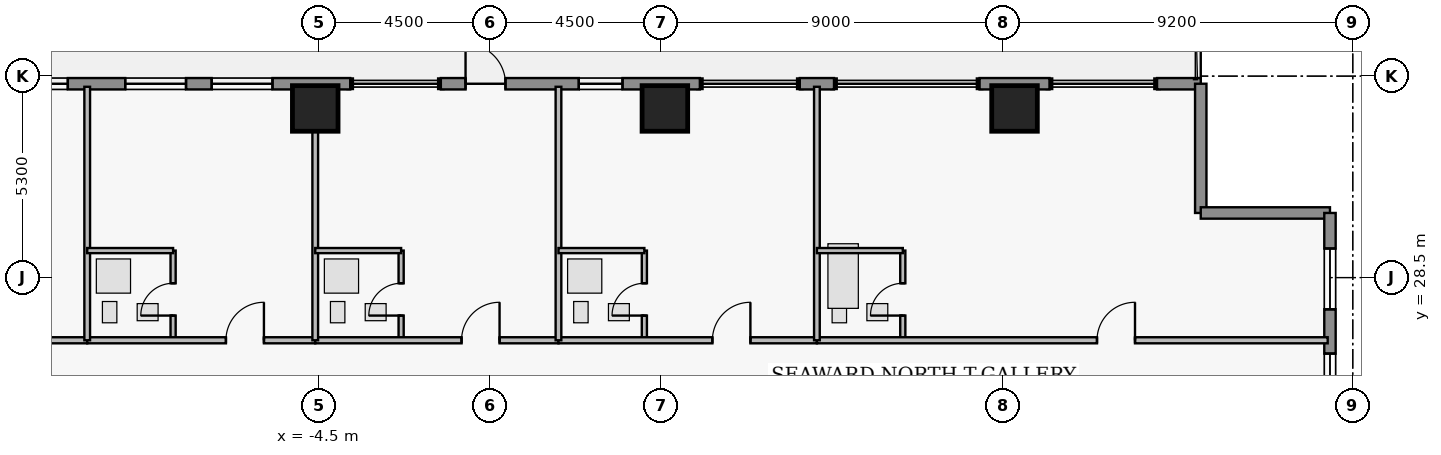
"""IFC4 building model, lengths in metres.
Left out: names, types, materials, properties, quantities, classifications, styles, units other than length and angle.
Written with IfcOpenShell. Run it as: python <this file> out.ifc"""

import sys

from ifc_helpers import new_model, si_unit, direction, frame, frame_2d, origin, origin_2d, place, context, subcontext, project, spatial, rectangle, extrude, element, fill, save


model = new_model("IFC4")
c1 = context("Model", 3, precision=1e-05, world=origin(), true_north=direction((0.0, 1.0)))
c2 = subcontext(c1, "Body", "Model", "MODEL_VIEW")
j1 = project(units=[si_unit("LENGTHUNIT", "METRE"), si_unit("PLANEANGLEUNIT", "RADIAN")], contexts=[c1])
p1 = place(None, origin())
s1 = spatial("IfcSite", under=j1, at=p1, CompositionType="ELEMENT")
p2 = place(p1, origin())
s2 = spatial("IfcBuilding", under=s1, at=p2, CompositionType="ELEMENT")
p3 = place(p2, frame((0.0, 0.0, 181.15)))
s3 = spatial("IfcBuildingStorey", under=s2, at=p3, CompositionType="ELEMENT", Elevation=181.15)
for number, where, z_axis, x_axis in (
    (1, (-4.6, 32.95, 0.0), (0.0, 0.0, 1.0), (1.0, 0.0, 0.0)),
    (2, (4.6, 32.95, 0.0), (0.0, 0.0, 1.0), (1.0, 0.0, 0.0)),
    (3, (13.8, 32.95, 0.0), (0.0, 0.0, 1.0), (1.0, 0.0, 0.0)),
):
    element("IfcColumn", number, at=place(p3, frame(where, z_axis=z_axis, x_axis=x_axis)), inside=s3, PredefinedType="COLUMN", context=c2, shape_type="SweptSolid", body=[
        extrude(rectangle(XDim=1.2, YDim=1.2, at=origin_2d()), origin(), (0.0, 0.0, 1.0), 3.75),
    ])
p4 = place(p3, frame((-14.72, 33.6, 0.0), z_axis=(0.0, 0.0, 1.0), x_axis=(1.0, 0.0, 0.0)))
e4 = element("IfcWall", 4, at=p4, inside=s3, PredefinedType="STANDARD", context=c2, shape_type="SweptSolid", body=[
    extrude(rectangle(XDim=11.04, YDim=0.3, at=frame_2d((5.52, 0.0))), origin(), (0.0, 0.0, 1.0), 3.53),
])
p5 = place(p4, frame((5.12, 0.0, 0.85)))
e5 = element("IfcOpeningElement", 5, at=p5, cuts=e4, PredefinedType="OPENING", context=c2, shape_type="SweptSolid", body=[
    extrude(rectangle(XDim=1.6, YDim=1.8, at=frame_2d((0.8, 0.9))), frame((0.0, 0.16, 0.0), z_axis=(0.0, -1.0, 0.0), x_axis=(1.0, 0.0, 0.0)), (0.0, 0.0, 1.0), 0.32),
])
p6 = place(p4, frame((2.01, 0.0, 0.85)))
e6 = element("IfcOpeningElement", 6, at=p6, cuts=e4, PredefinedType="OPENING", context=c2, shape_type="SweptSolid", body=[
    extrude(rectangle(XDim=1.6, YDim=1.8, at=frame_2d((0.8, 0.9))), frame((0.0, 0.16, 0.0), z_axis=(0.0, -1.0, 0.0), x_axis=(1.0, 0.0, 0.0)), (0.0, 0.0, 1.0), 0.32),
])
p7 = place(p4, frame((7.395, 0.0, 0.85)))
e7 = element("IfcOpeningElement", 7, at=p7, cuts=e4, PredefinedType="OPENING", context=c2, shape_type="SweptSolid", body=[
    extrude(rectangle(XDim=1.6, YDim=1.8, at=frame_2d((0.8, 0.9))), frame((0.0, 0.16, 0.0), z_axis=(0.0, -1.0, 0.0), x_axis=(1.0, 0.0, 0.0)), (0.0, 0.0, 1.0), 0.32),
])
p8 = place(p3, frame((-1.295, 33.6, 0.0), z_axis=(0.0, 0.0, 1.0), x_axis=(1.0, 0.0, 0.0)))
e8 = element("IfcWall", 8, at=p8, inside=s3, PredefinedType="STANDARD", context=c2, shape_type="SweptSolid", body=[
    extrude(rectangle(XDim=6.815, YDim=0.3, at=frame_2d((3.407, 0.0))), origin(), (0.0, 0.0, 1.0), 3.53),
])
p9 = place(p8, frame((0.65, 0.0, 0.0)))
e9 = element("IfcOpeningElement", 9, at=p9, cuts=e8, PredefinedType="OPENING", context=c2, shape_type="SweptSolid", body=[
    extrude(rectangle(XDim=1.05, YDim=2.2, at=frame_2d((0.525, 1.1))), frame((0.0, 0.16, 0.0), z_axis=(0.0, -1.0, 0.0), x_axis=(1.0, 0.0, 0.0)), (0.0, 0.0, 1.0), 0.32),
])
p10 = place(p8, frame((3.63, 0.0, 0.95)))
e10 = element("IfcOpeningElement", 10, at=p10, cuts=e8, PredefinedType="OPENING", context=c2, shape_type="SweptSolid", body=[
    extrude(rectangle(XDim=1.15, YDim=1.55, at=frame_2d((0.575, 0.775))), frame((0.0, 0.16, 0.0), z_axis=(0.0, -1.0, 0.0), x_axis=(1.0, 0.0, 0.0)), (0.0, 0.0, 1.0), 0.32),
])
p11 = place(p3, frame((8.15, 33.6, 0.0), z_axis=(0.0, 0.0, 1.0), x_axis=(1.0, 0.0, 0.0)))
e11 = element("IfcWall", 11, at=p11, inside=s3, PredefinedType="STANDARD", context=c2, shape_type="SweptSolid", body=[
    extrude(rectangle(XDim=0.9, YDim=0.3, at=frame_2d((0.45, 0.0))), origin(), (0.0, 0.0, 1.0), 3.53),
])
p12 = place(p3, frame((12.88, 33.6, 0.0), z_axis=(0.0, 0.0, 1.0), x_axis=(1.0, 0.0, 0.0)))
e12 = element("IfcWall", 12, at=p12, inside=s3, PredefinedType="STANDARD", context=c2, shape_type="SweptSolid", body=[
    extrude(rectangle(XDim=1.84, YDim=0.3, at=frame_2d((0.92, 0.0))), origin(), (0.0, 0.0, 1.0), 3.53),
])
p13 = place(p3, frame((17.55, 33.6, 0.0), z_axis=(0.0, 0.0, 1.0), x_axis=(1.0, 0.0, 0.0)))
e13 = element("IfcWall", 13, at=p13, inside=s3, PredefinedType="STANDARD", context=c2, shape_type="SweptSolid", body=[
    extrude(rectangle(XDim=1.15, YDim=0.3, at=frame_2d((0.575, 0.0))), origin(), (0.0, 0.0, 1.0), 3.53),
])
for number, where, z_axis, x_axis in (
    (14, (18.7, 33.6, 0.0), (0.0, 0.0, 1.0), (0.0, -1.0, 0.0)),
    (15, (18.7, 30.2, 0.0), (0.0, 0.0, 1.0), (1.0, 0.0, 0.0)),
):
    element("IfcWall", number, at=place(p3, frame(where, z_axis=z_axis, x_axis=x_axis)), inside=s3, PredefinedType="STANDARD", context=c2, shape_type="SweptSolid", body=[
        extrude(rectangle(XDim=3.4, YDim=0.3, at=frame_2d((1.7, 0.0))), origin(), (0.0, 0.0, 1.0), 3.53),
    ])
p14 = place(p3, frame((22.1, 30.2, 0.0), z_axis=(0.0, 0.0, 1.0), x_axis=(0.0, -1.0, 0.0)))
e16 = element("IfcWall", 16, at=p14, inside=s3, PredefinedType="STANDARD", context=c2, shape_type="SweptSolid", body=[
    extrude(rectangle(XDim=5.65, YDim=0.3, at=frame_2d((2.825, 0.0))), origin(), (0.0, 0.0, 1.0), 3.53),
])
p15 = place(p14, frame((0.935, 0.0, 0.85)))
e17 = element("IfcOpeningElement", 17, at=p15, cuts=e16, PredefinedType="OPENING", context=c2, shape_type="SweptSolid", body=[
    extrude(rectangle(XDim=1.6, YDim=1.8, at=frame_2d((0.8, 0.9))), frame((0.0, 0.16, 0.0), z_axis=(0.0, -1.0, 0.0), x_axis=(1.0, 0.0, 0.0)), (0.0, 0.0, 1.0), 0.32),
])
p16 = place(p14, frame((3.7, 0.0, 0.95)))
e18 = element("IfcOpeningElement", 18, at=p16, cuts=e16, PredefinedType="OPENING", context=c2, shape_type="SweptSolid", body=[
    extrude(rectangle(XDim=1.15, YDim=1.55, at=frame_2d((0.575, 0.775))), frame((0.0, 0.16, 0.0), z_axis=(0.0, -1.0, 0.0), x_axis=(1.0, 0.0, 0.0)), (0.0, 0.0, 1.0), 0.32),
])
p17 = place(p3, frame((-22.04, 26.85, 0.0), z_axis=(0.0, 0.0, 1.0), x_axis=(1.0, 0.0, 0.0)))
e19 = element("IfcWall", 19, at=p17, inside=s3, PredefinedType="PARTITIONING", context=c2, shape_type="SweptSolid", body=[
    extrude(rectangle(XDim=11.44, YDim=0.16, at=frame_2d((5.72, 0.0))), origin(), (0.0, 0.0, 1.0), 3.53),
])
p18 = place(p17, frame((6.37, 0.0, 0.0)))
e20 = element("IfcOpeningElement", 20, at=p18, cuts=e19, PredefinedType="OPENING", context=c2, shape_type="SweptSolid", body=[
    extrude(rectangle(XDim=1.0, YDim=2.15, at=frame_2d((0.5, 1.075))), frame((0.0, 0.09, 0.0), z_axis=(0.0, -1.0, 0.0), x_axis=(1.0, 0.0, 0.0)), (0.0, 0.0, 1.0), 0.18),
])
p19 = place(p3, frame((-8.34, 26.85, 0.0), z_axis=(0.0, 0.0, 1.0), x_axis=(0.0, 1.0, 0.0)))
e21 = element("IfcWall", 21, at=p19, inside=s3, PredefinedType="PLUMBINGWALL", context=c2, shape_type="SweptSolid", body=[
    extrude(rectangle(XDim=2.36, YDim=0.135, at=frame_2d((1.18, 0.0))), origin(), (0.0, 0.0, 1.0), 3.53),
])
p20 = place(p19, frame((0.65, 0.0, 0.0)))
e22 = element("IfcOpeningElement", 22, at=p20, cuts=e21, PredefinedType="OPENING", context=c2, shape_type="SweptSolid", body=[
    extrude(rectangle(XDim=0.85, YDim=2.1, at=frame_2d((0.425, 1.05))), frame((0.0, 0.077, 0.0), z_axis=(0.0, -1.0, 0.0), x_axis=(1.0, 0.0, 0.0)), (0.0, 0.0, 1.0), 0.155),
])
p21 = place(p3, frame((-10.6, 26.85, 0.0), z_axis=(0.0, 0.0, 1.0), x_axis=(1.0, 0.0, 0.0)))
e23 = element("IfcWall", 23, at=p21, inside=s3, PredefinedType="PARTITIONING", context=c2, shape_type="SweptSolid", body=[
    extrude(rectangle(XDim=6.0, YDim=0.16, at=frame_2d((3.0, 0.0))), origin(), (0.0, 0.0, 1.0), 3.53),
])
p22 = place(p21, frame((3.65, 0.0, 0.0)))
e24 = element("IfcOpeningElement", 24, at=p22, cuts=e23, PredefinedType="OPENING", context=c2, shape_type="SweptSolid", body=[
    extrude(rectangle(XDim=1.0, YDim=2.15, at=frame_2d((0.5, 1.075))), frame((0.0, 0.09, 0.0), z_axis=(0.0, -1.0, 0.0), x_axis=(1.0, 0.0, 0.0)), (0.0, 0.0, 1.0), 0.18),
])
p23 = place(p3, frame((-2.34, 26.85, 0.0), z_axis=(0.0, 0.0, 1.0), x_axis=(0.0, 1.0, 0.0)))
e25 = element("IfcWall", 25, at=p23, inside=s3, PredefinedType="PLUMBINGWALL", context=c2, shape_type="SweptSolid", body=[
    extrude(rectangle(XDim=2.36, YDim=0.135, at=frame_2d((1.18, 0.0))), origin(), (0.0, 0.0, 1.0), 3.53),
])
p24 = place(p23, frame((0.65, 0.0, 0.0)))
e26 = element("IfcOpeningElement", 26, at=p24, cuts=e25, PredefinedType="OPENING", context=c2, shape_type="SweptSolid", body=[
    extrude(rectangle(XDim=0.85, YDim=2.1, at=frame_2d((0.425, 1.05))), frame((0.0, 0.077, 0.0), z_axis=(0.0, -1.0, 0.0), x_axis=(1.0, 0.0, 0.0)), (0.0, 0.0, 1.0), 0.155),
])
p25 = place(p3, frame((-4.6, 26.85, 0.0), z_axis=(0.0, 0.0, 1.0), x_axis=(1.0, 0.0, 0.0)))
e27 = element("IfcWall", 27, at=p25, inside=s3, PredefinedType="PARTITIONING", context=c2, shape_type="SweptSolid", body=[
    extrude(rectangle(XDim=6.4, YDim=0.16, at=frame_2d((3.2, 0.0))), origin(), (0.0, 0.0, 1.0), 3.53),
])
p26 = place(p25, frame((3.85, 0.0, 0.0)))
e28 = element("IfcOpeningElement", 28, at=p26, cuts=e27, PredefinedType="OPENING", context=c2, shape_type="SweptSolid", body=[
    extrude(rectangle(XDim=1.0, YDim=2.15, at=frame_2d((0.5, 1.075))), frame((0.0, 0.09, 0.0), z_axis=(0.0, -1.0, 0.0), x_axis=(1.0, 0.0, 0.0)), (0.0, 0.0, 1.0), 0.18),
])
p27 = place(p3, frame((4.06, 26.85, 0.0), z_axis=(0.0, 0.0, 1.0), x_axis=(0.0, 1.0, 0.0)))
e29 = element("IfcWall", 29, at=p27, inside=s3, PredefinedType="PLUMBINGWALL", context=c2, shape_type="SweptSolid", body=[
    extrude(rectangle(XDim=2.36, YDim=0.135, at=frame_2d((1.18, 0.0))), origin(), (0.0, 0.0, 1.0), 3.53),
])
p28 = place(p27, frame((0.65, 0.0, 0.0)))
e30 = element("IfcOpeningElement", 30, at=p28, cuts=e29, PredefinedType="OPENING", context=c2, shape_type="SweptSolid", body=[
    extrude(rectangle(XDim=0.85, YDim=2.1, at=frame_2d((0.425, 1.05))), frame((0.0, 0.077, 0.0), z_axis=(0.0, -1.0, 0.0), x_axis=(1.0, 0.0, 0.0)), (0.0, 0.0, 1.0), 0.155),
])
p29 = place(p3, frame((1.8, 26.85, 0.0), z_axis=(0.0, 0.0, 1.0), x_axis=(1.0, 0.0, 0.0)))
e31 = element("IfcWall", 31, at=p29, inside=s3, PredefinedType="PARTITIONING", context=c2, shape_type="SweptSolid", body=[
    extrude(rectangle(XDim=6.8, YDim=0.16, at=frame_2d((3.4, 0.0))), origin(), (0.0, 0.0, 1.0), 3.53),
])
p30 = place(p29, frame((4.05, 0.0, 0.0)))
e32 = element("IfcOpeningElement", 32, at=p30, cuts=e31, PredefinedType="OPENING", context=c2, shape_type="SweptSolid", body=[
    extrude(rectangle(XDim=1.0, YDim=2.15, at=frame_2d((0.5, 1.075))), frame((0.0, 0.09, 0.0), z_axis=(0.0, -1.0, 0.0), x_axis=(1.0, 0.0, 0.0)), (0.0, 0.0, 1.0), 0.18),
])
p31 = place(p3, frame((10.86, 26.85, 0.0), z_axis=(0.0, 0.0, 1.0), x_axis=(0.0, 1.0, 0.0)))
e33 = element("IfcWall", 33, at=p31, inside=s3, PredefinedType="PLUMBINGWALL", context=c2, shape_type="SweptSolid", body=[
    extrude(rectangle(XDim=2.36, YDim=0.135, at=frame_2d((1.18, 0.0))), origin(), (0.0, 0.0, 1.0), 3.53),
])
p32 = place(p31, frame((0.65, 0.0, 0.0)))
e34 = element("IfcOpeningElement", 34, at=p32, cuts=e33, PredefinedType="OPENING", context=c2, shape_type="SweptSolid", body=[
    extrude(rectangle(XDim=0.85, YDim=2.1, at=frame_2d((0.425, 1.05))), frame((0.0, 0.077, 0.0), z_axis=(0.0, -1.0, 0.0), x_axis=(1.0, 0.0, 0.0)), (0.0, 0.0, 1.0), 0.155),
])
p33 = place(p3, frame((8.6, 26.85, 0.0), z_axis=(0.0, 0.0, 1.0), x_axis=(1.0, 0.0, 0.0)))
e35 = element("IfcWall", 35, at=p33, inside=s3, PredefinedType="PARTITIONING", context=c2, shape_type="SweptSolid", body=[
    extrude(rectangle(XDim=13.44, YDim=0.16, at=frame_2d((6.72, 0.0))), origin(), (0.0, 0.0, 1.0), 3.53),
])
p34 = place(p33, frame((7.37, 0.0, 0.0)))
e36 = element("IfcOpeningElement", 36, at=p34, cuts=e35, PredefinedType="OPENING", context=c2, shape_type="SweptSolid", body=[
    extrude(rectangle(XDim=1.0, YDim=2.15, at=frame_2d((0.5, 1.075))), frame((0.0, 0.09, 0.0), z_axis=(0.0, -1.0, 0.0), x_axis=(1.0, 0.0, 0.0)), (0.0, 0.0, 1.0), 0.18),
])
p35 = place(p3, frame((-10.6, 26.85, 0.0), z_axis=(0.0, 0.0, 1.0), x_axis=(0.0, 1.0, 0.0)))
e37 = element("IfcWall", 37, at=p35, inside=s3, PredefinedType="PARTITIONING", context=c2, shape_type="SweptSolid", body=[
    extrude(rectangle(XDim=6.67, YDim=0.15, at=frame_2d((3.335, 0.0))), origin(), (0.0, 0.0, 1.0), 3.53),
])
p36 = place(p3, frame((-10.6, 29.21, 0.0), z_axis=(0.0, 0.0, 1.0), x_axis=(1.0, 0.0, 0.0)))
e38 = element("IfcWall", 38, at=p36, inside=s3, PredefinedType="PLUMBINGWALL", context=c2, shape_type="SweptSolid", body=[
    extrude(rectangle(XDim=2.26, YDim=0.135, at=frame_2d((1.13, 0.0))), origin(), (0.0, 0.0, 1.0), 3.53),
])
p37 = place(p3, frame((-4.6, 26.85, 0.0), z_axis=(0.0, 0.0, 1.0), x_axis=(0.0, 1.0, 0.0)))
e39 = element("IfcWall", 39, at=p37, inside=s3, PredefinedType="PARTITIONING", context=c2, shape_type="SweptSolid", body=[
    extrude(rectangle(XDim=6.67, YDim=0.15, at=frame_2d((3.335, 0.0))), origin(), (0.0, 0.0, 1.0), 2.519),
])
p38 = place(p3, frame((-4.6, 29.21, 0.0), z_axis=(0.0, 0.0, 1.0), x_axis=(1.0, 0.0, 0.0)))
e40 = element("IfcWall", 40, at=p38, inside=s3, PredefinedType="PLUMBINGWALL", context=c2, shape_type="SweptSolid", body=[
    extrude(rectangle(XDim=2.26, YDim=0.135, at=frame_2d((1.13, 0.0))), origin(), (0.0, 0.0, 1.0), 3.53),
])
p39 = place(p3, frame((1.8, 26.85, 0.0), z_axis=(0.0, 0.0, 1.0), x_axis=(0.0, 1.0, 0.0)))
e41 = element("IfcWall", 41, at=p39, inside=s3, PredefinedType="PARTITIONING", context=c2, shape_type="SweptSolid", body=[
    extrude(rectangle(XDim=6.67, YDim=0.15, at=frame_2d((3.335, 0.0))), origin(), (0.0, 0.0, 1.0), 3.53),
])
p40 = place(p3, frame((1.8, 29.21, 0.0), z_axis=(0.0, 0.0, 1.0), x_axis=(1.0, 0.0, 0.0)))
e42 = element("IfcWall", 42, at=p40, inside=s3, PredefinedType="PLUMBINGWALL", context=c2, shape_type="SweptSolid", body=[
    extrude(rectangle(XDim=2.26, YDim=0.135, at=frame_2d((1.13, 0.0))), origin(), (0.0, 0.0, 1.0), 3.53),
])
p41 = place(p3, frame((8.6, 26.85, 0.0), z_axis=(0.0, 0.0, 1.0), x_axis=(0.0, 1.0, 0.0)))
e43 = element("IfcWall", 43, at=p41, inside=s3, PredefinedType="PARTITIONING", context=c2, shape_type="SweptSolid", body=[
    extrude(rectangle(XDim=6.67, YDim=0.15, at=frame_2d((3.335, 0.0))), origin(), (0.0, 0.0, 1.0), 3.53),
])
p42 = place(p3, frame((8.6, 29.21, 0.0), z_axis=(0.0, 0.0, 1.0), x_axis=(1.0, 0.0, 0.0)))
e44 = element("IfcWall", 44, at=p42, inside=s3, PredefinedType="PLUMBINGWALL", context=c2, shape_type="SweptSolid", body=[
    extrude(rectangle(XDim=2.26, YDim=0.135, at=frame_2d((1.13, 0.0))), origin(), (0.0, 0.0, 1.0), 3.53),
])
p43 = place(p5, origin())
e45 = element("IfcWindow", 45, at=p43, inside=s3, PartitioningType="SINGLE_PANEL", PredefinedType="WINDOW", context=c2, shape_type="SweptSolid", body=[
    extrude(rectangle(XDim=1.6, YDim=1.8, at=frame_2d((0.8, 0.9))), frame((0.0, 0.03, 0.0), z_axis=(0.0, -1.0, 0.0), x_axis=(1.0, 0.0, 0.0)), (0.0, 0.0, 1.0), 0.06),
])
fill(e5, e45)
p44 = place(p6, origin())
e46 = element("IfcWindow", 46, at=p44, inside=s3, PartitioningType="SINGLE_PANEL", PredefinedType="WINDOW", context=c2, shape_type="SweptSolid", body=[
    extrude(rectangle(XDim=1.6, YDim=1.8, at=frame_2d((0.8, 0.9))), frame((0.0, 0.03, 0.0), z_axis=(0.0, -1.0, 0.0), x_axis=(1.0, 0.0, 0.0)), (0.0, 0.0, 1.0), 0.06),
])
fill(e6, e46)
p45 = place(p7, origin())
e47 = element("IfcWindow", 47, at=p45, inside=s3, PartitioningType="SINGLE_PANEL", PredefinedType="WINDOW", context=c2, shape_type="SweptSolid", body=[
    extrude(rectangle(XDim=1.6, YDim=1.8, at=frame_2d((0.8, 0.9))), frame((0.0, 0.03, 0.0), z_axis=(0.0, -1.0, 0.0), x_axis=(1.0, 0.0, 0.0)), (0.0, 0.0, 1.0), 0.06),
])
fill(e7, e47)
p46 = place(p9, origin())
e48 = element("IfcDoor", 48, at=p46, inside=s3, OperationType="SINGLE_SWING_LEFT", PredefinedType="DOOR", context=c2, shape_type="SweptSolid", body=[
    extrude(rectangle(XDim=1.05, YDim=2.2, at=frame_2d((0.525, 1.1))), frame((0.0, 0.025, 0.0), z_axis=(0.0, -1.0, 0.0), x_axis=(1.0, 0.0, 0.0)), (0.0, 0.0, 1.0), 0.05),
])
fill(e9, e48)
p47 = place(p10, origin())
e49 = element("IfcWindow", 49, at=p47, inside=s3, PartitioningType="SINGLE_PANEL", PredefinedType="WINDOW", context=c2, shape_type="SweptSolid", body=[
    extrude(rectangle(XDim=1.15, YDim=1.55, at=frame_2d((0.575, 0.775))), frame((0.0, 0.03, 0.0), z_axis=(0.0, -1.0, 0.0), x_axis=(1.0, 0.0, 0.0)), (0.0, 0.0, 1.0), 0.06),
])
fill(e10, e49)
p48 = place(p15, origin())
e50 = element("IfcWindow", 50, at=p48, inside=s3, PartitioningType="SINGLE_PANEL", PredefinedType="WINDOW", context=c2, shape_type="SweptSolid", body=[
    extrude(rectangle(XDim=1.6, YDim=1.8, at=frame_2d((0.8, 0.9))), frame((0.0, 0.03, 0.0), z_axis=(0.0, -1.0, 0.0), x_axis=(1.0, 0.0, 0.0)), (0.0, 0.0, 1.0), 0.06),
])
fill(e17, e50)
p49 = place(p16, origin())
e51 = element("IfcWindow", 51, at=p49, inside=s3, PartitioningType="SINGLE_PANEL", PredefinedType="WINDOW", context=c2, shape_type="SweptSolid", body=[
    extrude(rectangle(XDim=1.15, YDim=1.55, at=frame_2d((0.575, 0.775))), frame((0.0, 0.03, 0.0), z_axis=(0.0, -1.0, 0.0), x_axis=(1.0, 0.0, 0.0)), (0.0, 0.0, 1.0), 0.06),
])
fill(e18, e51)
p50 = place(p20, origin())
e52 = element("IfcDoor", 52, at=p50, inside=s3, OperationType="SINGLE_SWING_LEFT", PredefinedType="DOOR", context=c2, shape_type="SweptSolid", body=[
    extrude(rectangle(XDim=0.85, YDim=2.1, at=frame_2d((0.425, 1.05))), frame((0.0, 0.025, 0.0), z_axis=(0.0, -1.0, 0.0), x_axis=(1.0, 0.0, 0.0)), (0.0, 0.0, 1.0), 0.05),
])
fill(e22, e52)
p51 = place(p22, origin())
e53 = element("IfcDoor", 53, at=p51, inside=s3, OperationType="SINGLE_SWING_RIGHT", PredefinedType="DOOR", context=c2, shape_type="SweptSolid", body=[
    extrude(rectangle(XDim=1.0, YDim=2.15, at=frame_2d((0.5, 1.075))), frame((0.0, 0.025, 0.0), z_axis=(0.0, -1.0, 0.0), x_axis=(1.0, 0.0, 0.0)), (0.0, 0.0, 1.0), 0.05),
])
fill(e24, e53)
p52 = place(p24, origin())
e54 = element("IfcDoor", 54, at=p52, inside=s3, OperationType="SINGLE_SWING_LEFT", PredefinedType="DOOR", context=c2, shape_type="SweptSolid", body=[
    extrude(rectangle(XDim=0.85, YDim=2.1, at=frame_2d((0.425, 1.05))), frame((0.0, 0.025, 0.0), z_axis=(0.0, -1.0, 0.0), x_axis=(1.0, 0.0, 0.0)), (0.0, 0.0, 1.0), 0.05),
])
fill(e26, e54)
p53 = place(p26, origin())
e55 = element("IfcDoor", 55, at=p53, inside=s3, OperationType="SINGLE_SWING_RIGHT", PredefinedType="DOOR", context=c2, shape_type="SweptSolid", body=[
    extrude(rectangle(XDim=1.0, YDim=2.15, at=frame_2d((0.5, 1.075))), frame((0.0, 0.025, 0.0), z_axis=(0.0, -1.0, 0.0), x_axis=(1.0, 0.0, 0.0)), (0.0, 0.0, 1.0), 0.05),
])
fill(e28, e55)
p54 = place(p28, origin())
e56 = element("IfcDoor", 56, at=p54, inside=s3, OperationType="SINGLE_SWING_LEFT", PredefinedType="DOOR", context=c2, shape_type="SweptSolid", body=[
    extrude(rectangle(XDim=0.85, YDim=2.1, at=frame_2d((0.425, 1.05))), frame((0.0, 0.025, 0.0), z_axis=(0.0, -1.0, 0.0), x_axis=(1.0, 0.0, 0.0)), (0.0, 0.0, 1.0), 0.05),
])
fill(e30, e56)
p55 = place(p30, origin())
e57 = element("IfcDoor", 57, at=p55, inside=s3, OperationType="SINGLE_SWING_RIGHT", PredefinedType="DOOR", context=c2, shape_type="SweptSolid", body=[
    extrude(rectangle(XDim=1.0, YDim=2.15, at=frame_2d((0.5, 1.075))), frame((0.0, 0.025, 0.0), z_axis=(0.0, -1.0, 0.0), x_axis=(1.0, 0.0, 0.0)), (0.0, 0.0, 1.0), 0.05),
])
fill(e32, e57)
p56 = place(p32, origin())
e58 = element("IfcDoor", 58, at=p56, inside=s3, OperationType="SINGLE_SWING_LEFT", PredefinedType="DOOR", context=c2, shape_type="SweptSolid", body=[
    extrude(rectangle(XDim=0.85, YDim=2.1, at=frame_2d((0.425, 1.05))), frame((0.0, 0.025, 0.0), z_axis=(0.0, -1.0, 0.0), x_axis=(1.0, 0.0, 0.0)), (0.0, 0.0, 1.0), 0.05),
])
fill(e34, e58)
p57 = place(p34, origin())
e59 = element("IfcDoor", 59, at=p57, inside=s3, OperationType="SINGLE_SWING_RIGHT", PredefinedType="DOOR", context=c2, shape_type="SweptSolid", body=[
    extrude(rectangle(XDim=1.0, YDim=2.15, at=frame_2d((0.5, 1.075))), frame((0.0, 0.025, 0.0), z_axis=(0.0, -1.0, 0.0), x_axis=(1.0, 0.0, 0.0)), (0.0, 0.0, 1.0), 0.05),
])
fill(e36, e59)
save(model, sys.argv[1])
